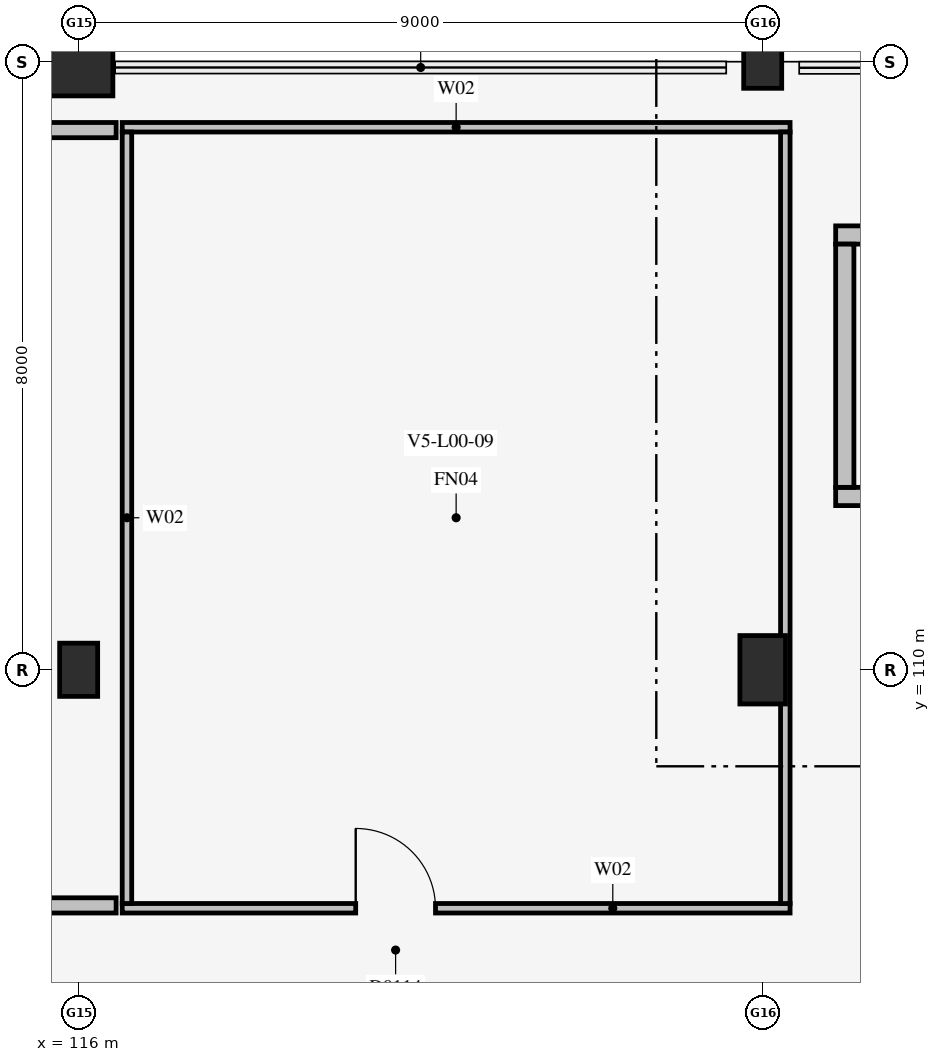
"""IFC4 building model, lengths in metres.
Left out: names, types, materials, properties, quantities, classifications, styles, units other than length and angle.
Written with IfcOpenShell. Run it as: python <this file> out.ifc"""

import sys

from ifc_helpers import new_model, si_unit, direction, frame, frame_2d, origin, origin_2d, place, context, subcontext, project, spatial, rectangle, extrude, element, fill, save


model = new_model("IFC4")
c1 = context("Model", 3, precision=1e-05, world=origin(), true_north=direction((0.0, 1.0)))
c2 = subcontext(c1, "Body", "Model", "MODEL_VIEW")
j1 = project(units=[si_unit("LENGTHUNIT", "METRE"), si_unit("PLANEANGLEUNIT", "RADIAN")], contexts=[c1])
p1 = place(None, origin())
s1 = spatial("IfcSite", under=j1, at=p1, CompositionType="ELEMENT")
p2 = place(p1, origin())
s2 = spatial("IfcBuilding", under=s1, at=p2, CompositionType="ELEMENT")
p3 = place(p2, origin())
s3 = spatial("IfcBuildingStorey", under=s2, at=p3, CompositionType="ELEMENT", Elevation=0.0)
p4 = place(p3, frame((125.96, 112.28, 0.0), z_axis=(0.0, 0.0, 1.0), x_axis=(1.0, 0.0, 0.0)))
e1 = element("IfcWall", 1, at=p4, inside=s3, PredefinedType="SOLIDWALL", context=c2, shape_type="SweptSolid", body=[
    extrude(rectangle(XDim=2.88, YDim=0.24, at=frame_2d((1.44, 0.0))), origin(), (0.0, 0.0, 1.0), 5.4),
])
p5 = place(p4, frame((0.84, 0.0, 0.0)))
e2 = element("IfcOpeningElement", 2, at=p5, cuts=e1, PredefinedType="OPENING", context=c2, shape_type="SweptSolid", body=[
    extrude(rectangle(XDim=1.2, YDim=2.2, at=frame_2d((0.6, 1.1))), frame((0.0, 0.132, 0.0), z_axis=(0.0, -1.0, 0.0), x_axis=(1.0, 0.0, 0.0)), (0.0, 0.0, 1.0), 0.264),
])
p6 = place(p3, frame((125.96, 115.72, 0.0), z_axis=(0.0, 0.0, 1.0), x_axis=(1.0, 0.0, 0.0)))
e3 = element("IfcWall", 3, at=p6, inside=s3, PredefinedType="SOLIDWALL", context=c2, shape_type="SweptSolid", body=[
    extrude(rectangle(XDim=2.88, YDim=0.24, at=frame_2d((1.44, 0.0))), origin(), (0.0, 0.0, 1.0), 5.4),
])
p7 = place(p3, frame((126.08, 112.4, 0.0), z_axis=(0.0, 0.0, 1.0), x_axis=(0.0, 1.0, 0.0)))
e4 = element("IfcWall", 4, at=p7, inside=s3, PredefinedType="SOLIDWALL", context=c2, shape_type="SweptSolid", body=[
    extrude(rectangle(XDim=3.2, YDim=0.24, at=frame_2d((1.6, 0.0))), origin(), (0.0, 0.0, 1.0), 5.4),
])
p8 = place(p3, frame((116.0, 110.0, 0.0), z_axis=(0.0, 0.0, 1.0), x_axis=(1.0, 0.0, 0.0)))
e5 = element("IfcColumn", 5, at=p8, inside=s3, PredefinedType="COLUMN", context=c2, shape_type="SweptSolid", body=[
    extrude(rectangle(XDim=0.5, YDim=0.7, at=origin_2d()), origin(), (0.0, 0.0, 1.0), 5.4),
])
p9 = place(p3, frame((116.0, 118.0, 0.0), z_axis=(0.0, 0.0, 1.0), x_axis=(1.0, 0.0, 0.0)))
e6 = element("IfcColumn", 6, at=p9, inside=s3, PredefinedType="COLUMN", context=c2, shape_type="SweptSolid", body=[
    extrude(rectangle(XDim=0.9, YDim=0.9, at=origin_2d()), origin(), (0.0, 0.0, 1.0), 5.4),
])
p10 = place(p3, frame((125.0, 110.0, 0.0), z_axis=(0.0, 0.0, 1.0), x_axis=(1.0, 0.0, 0.0)))
e7 = element("IfcColumn", 7, at=p10, inside=s3, PredefinedType="COLUMN", context=c2, shape_type="SweptSolid", body=[
    extrude(rectangle(XDim=0.6, YDim=0.9, at=origin_2d()), origin(), (0.0, 0.0, 1.0), 5.4),
])
p11 = place(p3, frame((125.0, 118.0, 0.0), z_axis=(0.0, 0.0, 1.0), x_axis=(1.0, 0.0, 0.0)))
e8 = element("IfcColumn", 8, at=p11, inside=s3, PredefinedType="COLUMN", context=c2, shape_type="SweptSolid", body=[
    extrude(rectangle(XDim=0.5, YDim=0.7, at=origin_2d()), origin(), (0.0, 0.0, 1.0), 5.4),
])
p12 = place(p3, frame((107.707, 106.9, 0.0), z_axis=(0.0, 0.0, 1.0), x_axis=(1.0, 0.0, 0.0)))
e9 = element("IfcWall", 9, at=p12, inside=s3, PredefinedType="PLUMBINGWALL", context=c2, shape_type="SweptSolid", body=[
    extrude(rectangle(XDim=8.786, YDim=0.2, at=frame_2d((4.393, 0.0))), origin(), (0.0, 0.0, 1.0), 5.125),
])
p13 = place(p12, frame((3.129, 0.0, 0.0)))
e10 = element("IfcOpeningElement", 10, at=p13, cuts=e9, PredefinedType="OPENING", context=c2, shape_type="SweptSolid", body=[
    extrude(rectangle(XDim=0.9, YDim=2.1, at=frame_2d((0.45, 1.05))), frame((0.0, 0.112, 0.0), z_axis=(0.0, -1.0, 0.0), x_axis=(1.0, 0.0, 0.0)), (0.0, 0.0, 1.0), 0.224),
])
p14 = place(p3, frame((107.707, 117.1, 0.0), z_axis=(0.0, 0.0, 1.0), x_axis=(1.0, 0.0, 0.0)))
e11 = element("IfcWall", 11, at=p14, inside=s3, PredefinedType="PLUMBINGWALL", context=c2, shape_type="SweptSolid", body=[
    extrude(rectangle(XDim=8.786, YDim=0.2, at=frame_2d((4.393, 0.0))), origin(), (0.0, 0.0, 1.0), 5.125),
])
p15 = place(p3, frame((116.573, 106.863, 0.0), z_axis=(0.0, 0.0, 1.0), x_axis=(1.0, 0.0, 0.0)))
e12 = element("IfcWall", 12, at=p15, inside=s3, PredefinedType="PARTITIONING", context=c2, shape_type="SweptSolid", body=[
    extrude(rectangle(XDim=8.787, YDim=0.125, at=frame_2d((4.394, 0.0))), origin(), (0.0, 0.0, 1.0), 5.125),
])
p16 = place(p15, frame((3.072, 0.0, 0.0)))
e13 = element("IfcOpeningElement", 13, at=p16, cuts=e12, PredefinedType="OPENING", context=c2, shape_type="SweptSolid", body=[
    extrude(rectangle(XDim=1.05, YDim=2.15, at=frame_2d((0.525, 1.075))), frame((0.0, 0.074, 0.0), z_axis=(0.0, -1.0, 0.0), x_axis=(1.0, 0.0, 0.0)), (0.0, 0.0, 1.0), 0.149),
])
p17 = place(p3, frame((116.573, 117.137, 0.0), z_axis=(0.0, 0.0, 1.0), x_axis=(1.0, 0.0, 0.0)))
e14 = element("IfcWall", 14, at=p17, inside=s3, PredefinedType="PARTITIONING", context=c2, shape_type="SweptSolid", body=[
    extrude(rectangle(XDim=8.787, YDim=0.125, at=frame_2d((4.394, 0.0))), origin(), (0.0, 0.0, 1.0), 5.125),
])
for number, where, z_axis, x_axis in (
    (15, (125.298, 106.925, 0.0), (0.0, 0.0, 1.0), (0.0, 1.0, 0.0)),
    (16, (116.635, 106.925, 0.0), (0.0, 0.0, 1.0), (0.0, 1.0, 0.0)),
):
    element("IfcWall", number, at=place(p3, frame(where, z_axis=z_axis, x_axis=x_axis)), inside=s3, PredefinedType="PARTITIONING", context=c2, shape_type="SweptSolid", body=[
        extrude(rectangle(XDim=10.15, YDim=0.125, at=frame_2d((5.075, 0.0))), origin(), (0.0, 0.0, 1.0), 5.125),
    ])
p18 = place(p16, origin())
e17 = element("IfcDoor", 17, at=p18, inside=s3, OperationType="SINGLE_SWING_LEFT", PredefinedType="DOOR", context=c2, shape_type="SweptSolid", body=[
    extrude(rectangle(XDim=1.05, YDim=2.15, at=frame_2d((0.525, 1.075))), frame((0.0, 0.025, 0.0), z_axis=(0.0, -1.0, 0.0), x_axis=(1.0, 0.0, 0.0)), (0.0, 0.0, 1.0), 0.05),
])
fill(e13, e17)
save(model, sys.argv[1])
